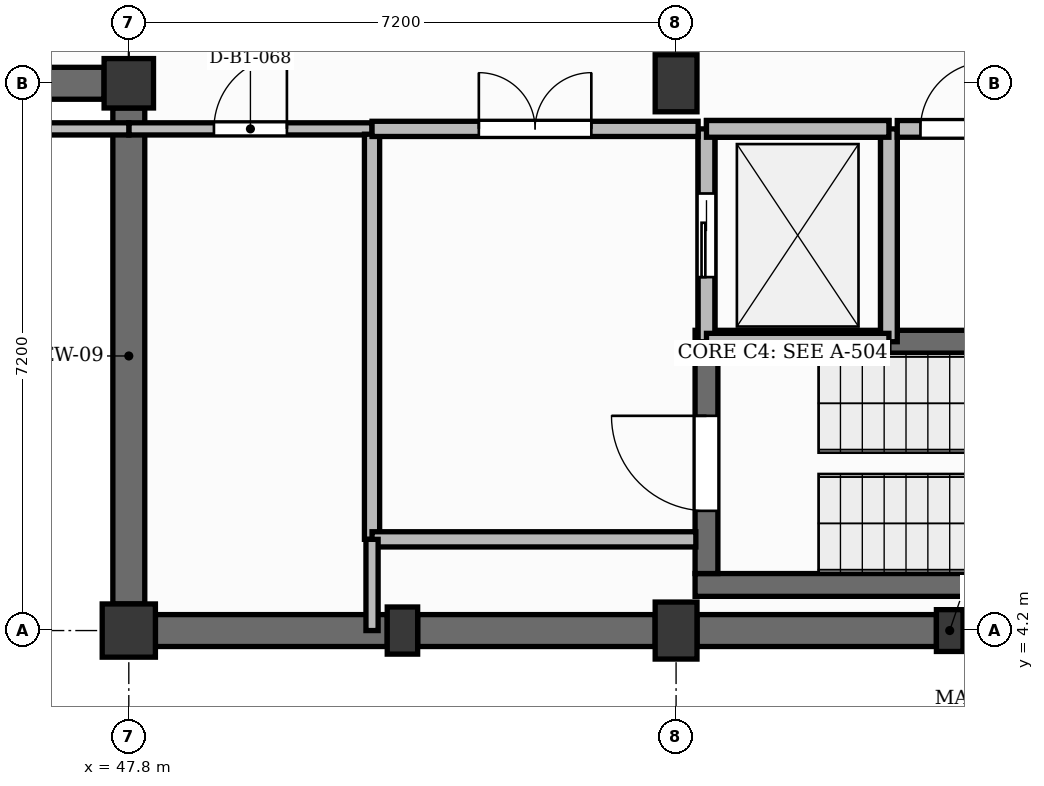
"""IFC4 building model, lengths in metres.
Left out: names, types, materials, properties, quantities, classifications, styles, units other than length and angle.
Written with IfcOpenShell. Run it as: python <this file> out.ifc"""

import sys

from ifc_helpers import new_model, si_unit, direction, frame, frame_2d, origin, origin_2d, place, context, subcontext, project, spatial, rectangle, extrude, element, fill, save


model = new_model("IFC4")
c1 = context("Model", 3, precision=1e-05, world=origin(), true_north=direction((0.0, 1.0)))
c2 = subcontext(c1, "Body", "Model", "MODEL_VIEW")
j1 = project(units=[si_unit("LENGTHUNIT", "METRE"), si_unit("PLANEANGLEUNIT", "RADIAN")], contexts=[c1])
p1 = place(None, origin())
s1 = spatial("IfcSite", under=j1, at=p1, CompositionType="ELEMENT")
p2 = place(p1, origin())
s2 = spatial("IfcBuilding", under=s1, at=p2, CompositionType="ELEMENT")
p3 = place(p2, frame((0.0, 0.0, -4.5)))
s3 = spatial("IfcBuildingStorey", under=s2, at=p3, CompositionType="ELEMENT", Elevation=-4.5)
p4 = place(p3, frame((47.8, 4.2, 0.0), z_axis=(0.0, 0.0, 1.0), x_axis=(1.0, 0.0, 0.0)))
e1 = element("IfcColumn", 1, at=p4, inside=s3, PredefinedType="COLUMN", context=c2, shape_type="SweptSolid", body=[
    extrude(rectangle(XDim=0.7, YDim=0.7, at=origin_2d()), origin(), (0.0, 0.0, 1.0), 4.2),
])
p5 = place(p3, frame((47.8, 11.4, 0.0), z_axis=(0.0, 0.0, 1.0), x_axis=(1.0, 0.0, 0.0)))
e2 = element("IfcColumn", 2, at=p5, inside=s3, PredefinedType="COLUMN", context=c2, shape_type="SweptSolid", body=[
    extrude(rectangle(XDim=0.65, YDim=0.65, at=origin_2d()), origin(), (0.0, 0.0, 1.0), 4.2),
])
for number, where, z_axis, x_axis in (
    (3, (55.0, 4.2, 0.0), (0.0, 0.0, 1.0), (1.0, 0.0, 0.0)),
    (4, (55.0, 11.4, 0.0), (0.0, 0.0, 1.0), (1.0, 0.0, 0.0)),
):
    element("IfcColumn", number, at=place(p3, frame(where, z_axis=z_axis, x_axis=x_axis)), inside=s3, PredefinedType="COLUMN", context=c2, shape_type="SweptSolid", body=[
        extrude(rectangle(XDim=0.55, YDim=0.75, at=origin_2d()), origin(), (0.0, 0.0, 1.0), 4.2),
    ])
p6 = place(p3, frame((51.4, 4.2, 0.0), z_axis=(0.0, 0.0, 1.0), x_axis=(1.0, 0.0, 0.0)))
e5 = element("IfcColumn", 5, at=p6, inside=s3, PredefinedType="PILASTER", context=c2, shape_type="SweptSolid", body=[
    extrude(rectangle(XDim=0.4, YDim=0.62, at=origin_2d()), origin(), (0.0, 0.0, 1.0), 4.2),
])
p7 = place(p3, frame((58.6, 4.2, 0.0), z_axis=(0.0, 0.0, 1.0), x_axis=(1.0, 0.0, 0.0)))
e6 = element("IfcColumn", 6, at=p7, inside=s3, PredefinedType="PILASTER", context=c2, shape_type="SweptSolid", body=[
    extrude(rectangle(XDim=0.35, YDim=0.55, at=origin_2d()), origin(), (0.0, 0.0, 1.0), 4.2),
])
p8 = place(p3, frame((40.95, 11.4, 0.0), z_axis=(0.0, 0.0, 1.0), x_axis=(1.0, 0.0, 0.0)))
e7 = element("IfcWall", 7, at=p8, inside=s3, PredefinedType="USERDEFINED", context=c2, shape_type="SweptSolid", body=[
    extrude(rectangle(XDim=6.525, YDim=0.42, at=frame_2d((3.263, 0.0))), origin(), (0.0, 0.0, 1.0), 4.2),
])
p9 = place(p3, frame((48.15, 4.2, 0.0), z_axis=(0.0, 0.0, 1.0), x_axis=(1.0, 0.0, 0.0)))
e8 = element("IfcWall", 8, at=p9, inside=s3, PredefinedType="USERDEFINED", context=c2, shape_type="SweptSolid", body=[
    extrude(rectangle(XDim=3.05, YDim=0.42, at=frame_2d((1.525, 0.0))), origin(), (0.0, 0.0, 1.0), 4.2),
])
p10 = place(p3, frame((51.6, 4.2, 0.0), z_axis=(0.0, 0.0, 1.0), x_axis=(1.0, 0.0, 0.0)))
e9 = element("IfcWall", 9, at=p10, inside=s3, PredefinedType="USERDEFINED", context=c2, shape_type="SweptSolid", body=[
    extrude(rectangle(XDim=3.125, YDim=0.42, at=frame_2d((1.562, 0.0))), origin(), (0.0, 0.0, 1.0), 4.2),
])
p11 = place(p3, frame((47.8, 4.55, 0.0), z_axis=(0.0, 0.0, 1.0), x_axis=(0.0, 1.0, 0.0)))
e10 = element("IfcWall", 10, at=p11, inside=s3, PredefinedType="USERDEFINED", context=c2, shape_type="SweptSolid", body=[
    extrude(rectangle(XDim=6.525, YDim=0.42, at=frame_2d((3.262, 0.0))), origin(), (0.0, 0.0, 1.0), 4.2),
])
p12 = place(p3, frame((55.275, 4.2, 0.0), z_axis=(0.0, 0.0, 1.0), x_axis=(1.0, 0.0, 0.0)))
e11 = element("IfcWall", 11, at=p12, inside=s3, PredefinedType="USERDEFINED", context=c2, shape_type="SweptSolid", body=[
    extrude(rectangle(XDim=3.15, YDim=0.42, at=frame_2d((1.575, 0.0))), origin(), (0.0, 0.0, 1.0), 4.2),
])
p13 = place(p3, frame((58.775, 4.2, 0.0), z_axis=(0.0, 0.0, 1.0), x_axis=(1.0, 0.0, 0.0)))
e12 = element("IfcWall", 12, at=p13, inside=s3, PredefinedType="USERDEFINED", context=c2, shape_type="SweptSolid", body=[
    extrude(rectangle(XDim=3.1, YDim=0.42, at=frame_2d((1.55, 0.0))), origin(), (0.0, 0.0, 1.0), 4.2),
])
for number, where, z_axis, x_axis in (
    (13, (55.25, 4.8, 0.0), (0.0, 0.0, 1.0), (1.0, 0.0, 0.0)),
    (14, (55.25, 8.0, 0.0), (0.0, 0.0, 1.0), (1.0, 0.0, 0.0)),
):
    element("IfcWall", number, at=place(p3, frame(where, z_axis=z_axis, x_axis=x_axis)), inside=s3, PredefinedType="SHEAR", context=c2, shape_type="SweptSolid", body=[
        extrude(rectangle(XDim=6.7, YDim=0.3, at=frame_2d((3.35, 0.0))), origin(), (0.0, 0.0, 1.0), 4.25),
    ])
p14 = place(p3, frame((55.4, 4.95, 0.0), z_axis=(0.0, 0.0, 1.0), x_axis=(0.0, 1.0, 0.0)))
e15 = element("IfcWall", 15, at=p14, inside=s3, PredefinedType="SHEAR", context=c2, shape_type="SweptSolid", body=[
    extrude(rectangle(XDim=2.9, YDim=0.3, at=frame_2d((1.45, 0.0))), origin(), (0.0, 0.0, 1.0), 4.25),
])
p15 = place(p14, frame((0.825, 0.0, 0.0)))
e16 = element("IfcOpeningElement", 16, at=p15, cuts=e15, PredefinedType="OPENING", context=c2, shape_type="SweptSolid", body=[
    extrude(rectangle(XDim=1.25, YDim=2.15, at=frame_2d((0.625, 1.075))), frame((0.0, 0.16, 0.0), z_axis=(0.0, -1.0, 0.0), x_axis=(1.0, 0.0, 0.0)), (0.0, 0.0, 1.0), 0.32),
])
p16 = place(p3, frame((55.4, 10.8, 0.0), z_axis=(0.0, 0.0, 1.0), x_axis=(1.0, 0.0, 0.0)))
e17 = element("IfcWall", 17, at=p16, inside=s3, PredefinedType="SOLIDWALL", context=c2, shape_type="SweptSolid", body=[
    extrude(rectangle(XDim=2.4, YDim=0.22, at=frame_2d((1.2, 0.0))), origin(), (0.0, 0.0, 1.0), 4.25),
])
p17 = place(p3, frame((55.4, 8.11, 0.0), z_axis=(0.0, 0.0, 1.0), x_axis=(0.0, 1.0, 0.0)))
e18 = element("IfcWall", 18, at=p17, inside=s3, PredefinedType="SOLIDWALL", context=c2, shape_type="SweptSolid", body=[
    extrude(rectangle(XDim=2.58, YDim=0.22, at=frame_2d((1.29, 0.0))), origin(), (0.0, 0.0, 1.0), 4.25),
])
p18 = place(p17, frame((0.74, 0.0, 0.0)))
e19 = element("IfcOpeningElement", 19, at=p18, cuts=e18, PredefinedType="OPENING", context=c2, shape_type="SweptSolid", body=[
    extrude(rectangle(XDim=1.1, YDim=2.15, at=frame_2d((0.55, 1.075))), frame((0.0, 0.12, 0.0), z_axis=(0.0, -1.0, 0.0), x_axis=(1.0, 0.0, 0.0)), (0.0, 0.0, 1.0), 0.24),
])
p19 = place(p3, frame((57.8, 8.11, 0.0), z_axis=(0.0, 0.0, 1.0), x_axis=(0.0, 1.0, 0.0)))
e20 = element("IfcWall", 20, at=p19, inside=s3, PredefinedType="SOLIDWALL", context=c2, shape_type="SweptSolid", body=[
    extrude(rectangle(XDim=2.58, YDim=0.22, at=frame_2d((1.29, 0.0))), origin(), (0.0, 0.0, 1.0), 4.25),
])
for number, where, z_axis, x_axis in (
    (21, (55.4, 8.0, -0.9), (0.0, 0.0, 1.0), (0.0, 1.0, 0.0)),
    (22, (57.8, 8.0, -0.9), (0.0, 0.0, 1.0), (0.0, 1.0, 0.0)),
):
    element("IfcWall", number, at=place(p3, frame(where, z_axis=z_axis, x_axis=x_axis)), inside=s3, PredefinedType="SOLIDWALL", context=c2, shape_type="SweptSolid", body=[
        extrude(rectangle(XDim=2.8, YDim=0.22, at=frame_2d((1.4, 0.0))), origin(), (0.0, 0.0, 1.0), 0.9),
    ])
for number, where, z_axis, x_axis in (
    (23, (55.4, 8.0, -0.9), (0.0, 0.0, 1.0), (1.0, 0.0, 0.0)),
    (24, (55.4, 10.8, -0.9), (0.0, 0.0, 1.0), (1.0, 0.0, 0.0)),
):
    element("IfcWall", number, at=place(p3, frame(where, z_axis=z_axis, x_axis=x_axis)), inside=s3, PredefinedType="SOLIDWALL", context=c2, shape_type="SweptSolid", body=[
        extrude(rectangle(XDim=2.4, YDim=0.22, at=frame_2d((1.2, 0.0))), origin(), (0.0, 0.0, 1.0), 0.9),
    ])
p20 = place(p3, frame((47.8, 10.8, 0.0), z_axis=(0.0, 0.0, 1.0), x_axis=(1.0, 0.0, 0.0)))
e25 = element("IfcWall", 25, at=p20, inside=s3, PredefinedType="PARTITIONING", context=c2, shape_type="SweptSolid", body=[
    extrude(rectangle(XDim=3.2, YDim=0.16, at=frame_2d((1.6, 0.0))), origin(), (0.0, 0.0, 1.0), 4.08),
])
p21 = place(p20, frame((1.12, 0.0, 0.0)))
e26 = element("IfcOpeningElement", 26, at=p21, cuts=e25, PredefinedType="OPENING", context=c2, shape_type="SweptSolid", body=[
    extrude(rectangle(XDim=0.96, YDim=2.1, at=frame_2d((0.48, 1.05))), frame((0.0, 0.09, 0.0), z_axis=(0.0, -1.0, 0.0), x_axis=(1.0, 0.0, 0.0)), (0.0, 0.0, 1.0), 0.18),
])
p22 = place(p3, frame((51.0, 5.4, 0.0), z_axis=(0.0, 0.0, 1.0), x_axis=(0.0, 1.0, 0.0)))
e27 = element("IfcWall", 27, at=p22, inside=s3, PredefinedType="PARTITIONING", context=c2, shape_type="SweptSolid", body=[
    extrude(rectangle(XDim=5.33, YDim=0.2, at=frame_2d((2.665, 0.0))), origin(), (0.0, 0.0, 1.0), 4.08),
])
p23 = place(p3, frame((51.0, 10.8, 0.0), z_axis=(0.0, 0.0, 1.0), x_axis=(1.0, 0.0, 0.0)))
e28 = element("IfcWall", 28, at=p23, inside=s3, PredefinedType="PARTITIONING", context=c2, shape_type="SweptSolid", body=[
    extrude(rectangle(XDim=4.29, YDim=0.2, at=frame_2d((2.145, 0.0))), origin(), (0.0, 0.0, 1.0), 4.08),
])
p24 = place(p23, frame((1.405, 0.0, 0.0)))
e29 = element("IfcOpeningElement", 29, at=p24, cuts=e28, PredefinedType="OPENING", context=c2, shape_type="SweptSolid", body=[
    extrude(rectangle(XDim=1.48, YDim=2.25, at=frame_2d((0.74, 1.125))), frame((0.0, 0.11, 0.0), z_axis=(0.0, -1.0, 0.0), x_axis=(1.0, 0.0, 0.0)), (0.0, 0.0, 1.0), 0.22),
])
p25 = place(p3, frame((57.91, 10.8, 0.0), z_axis=(0.0, 0.0, 1.0), x_axis=(1.0, 0.0, 0.0)))
e30 = element("IfcWall", 30, at=p25, inside=s3, PredefinedType="SOLIDWALL", context=c2, shape_type="SweptSolid", body=[
    extrude(rectangle(XDim=1.49, YDim=0.22, at=frame_2d((0.745, 0.0))), origin(), (0.0, 0.0, 1.0), 4.08),
])
p26 = place(p25, frame((0.305, 0.0, 0.0)))
e31 = element("IfcOpeningElement", 31, at=p26, cuts=e30, PredefinedType="OPENING", context=c2, shape_type="SweptSolid", body=[
    extrude(rectangle(XDim=0.88, YDim=2.05, at=frame_2d((0.44, 1.025))), frame((0.0, 0.12, 0.0), z_axis=(0.0, -1.0, 0.0), x_axis=(1.0, 0.0, 0.0)), (0.0, 0.0, 1.0), 0.24),
])
p27 = place(p3, frame((51.0, 5.4, 0.0), z_axis=(0.0, 0.0, 1.0), x_axis=(1.0, 0.0, 0.0)))
e32 = element("IfcWall", 32, at=p27, inside=s3, PredefinedType="PARTITIONING", context=c2, shape_type="SweptSolid", body=[
    extrude(rectangle(XDim=4.26, YDim=0.2, at=frame_2d((2.13, 0.0))), origin(), (0.0, 0.0, 1.0), 4.08),
])
p28 = place(p3, frame((40.6, 10.8, 0.0), z_axis=(0.0, 0.0, 1.0), x_axis=(1.0, 0.0, 0.0)))
e33 = element("IfcWall", 33, at=p28, inside=s3, PredefinedType="PARTITIONING", context=c2, shape_type="SweptSolid", body=[
    extrude(rectangle(XDim=7.2, YDim=0.16, at=frame_2d((3.6, 0.0))), origin(), (0.0, 0.0, 1.0), 4.08),
])
p29 = place(p3, frame((51.0, 4.2, 0.0), z_axis=(0.0, 0.0, 1.0), x_axis=(0.0, 1.0, 0.0)))
e34 = element("IfcWall", 34, at=p29, inside=s3, PredefinedType="PARTITIONING", context=c2, shape_type="SweptSolid", body=[
    extrude(rectangle(XDim=1.2, YDim=0.16, at=frame_2d((0.6, 0.0))), origin(), (0.0, 0.0, 1.0), 4.08),
])
p30 = place(p18, origin())
e35 = element("IfcDoor", 35, at=p30, inside=s3, OperationType="SLIDING_TO_LEFT", PredefinedType="DOOR", context=c2, shape_type="SweptSolid", body=[
    extrude(rectangle(XDim=1.1, YDim=2.15, at=frame_2d((0.55, 1.075))), frame((0.0, 0.025, 0.0), z_axis=(0.0, -1.0, 0.0), x_axis=(1.0, 0.0, 0.0)), (0.0, 0.0, 1.0), 0.05),
])
fill(e19, e35)
p31 = place(p15, origin())
e36 = element("IfcDoor", 36, at=p31, inside=s3, OperationType="SINGLE_SWING_RIGHT", PredefinedType="DOOR", context=c2, shape_type="SweptSolid", body=[
    extrude(rectangle(XDim=1.25, YDim=2.15, at=frame_2d((0.625, 1.075))), frame((0.0, 0.025, 0.0), z_axis=(0.0, -1.0, 0.0), x_axis=(1.0, 0.0, 0.0)), (0.0, 0.0, 1.0), 0.05),
])
fill(e16, e36)
p32 = place(p24, origin())
e37 = element("IfcDoor", 37, at=p32, inside=s3, OperationType="DOUBLE_DOOR_SINGLE_SWING", PredefinedType="DOOR", context=c2, shape_type="SweptSolid", body=[
    extrude(rectangle(XDim=1.48, YDim=2.25, at=frame_2d((0.74, 1.125))), frame((0.0, 0.025, 0.0), z_axis=(0.0, -1.0, 0.0), x_axis=(1.0, 0.0, 0.0)), (0.0, 0.0, 1.0), 0.05),
])
fill(e29, e37)
p33 = place(p26, origin())
e38 = element("IfcDoor", 38, at=p33, inside=s3, OperationType="SINGLE_SWING_RIGHT", PredefinedType="DOOR", context=c2, shape_type="SweptSolid", body=[
    extrude(rectangle(XDim=0.88, YDim=2.05, at=frame_2d((0.44, 1.025))), frame((0.0, 0.025, 0.0), z_axis=(0.0, -1.0, 0.0), x_axis=(1.0, 0.0, 0.0)), (0.0, 0.0, 1.0), 0.05),
])
fill(e31, e38)
p34 = place(p21, origin())
e39 = element("IfcDoor", 39, at=p34, inside=s3, OperationType="SINGLE_SWING_RIGHT", PredefinedType="DOOR", context=c2, shape_type="SweptSolid", body=[
    extrude(rectangle(XDim=0.96, YDim=2.1, at=frame_2d((0.48, 1.05))), frame((0.0, 0.025, 0.0), z_axis=(0.0, -1.0, 0.0), x_axis=(1.0, 0.0, 0.0)), (0.0, 0.0, 1.0), 0.05),
])
fill(e26, e39)
save(model, sys.argv[1])
